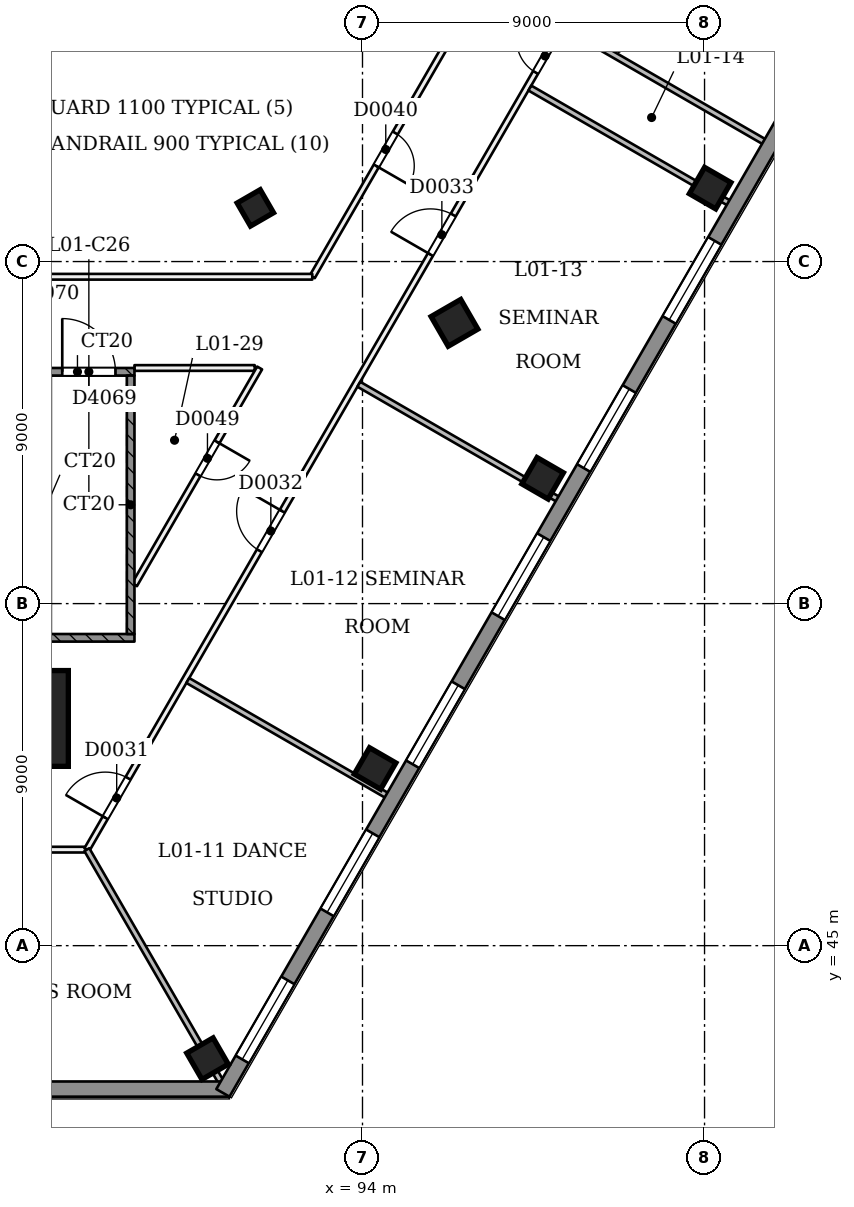
"""IFC4 building model, lengths in metres.
Left out: names, types, materials, properties, quantities, classifications, styles, units other than length and angle.
Written with IfcOpenShell. Run it as: python <this file> out.ifc"""

import sys

from ifc_helpers import new_model, si_unit, direction, frame, frame_2d, origin, origin_2d, place, context, subcontext, project, spatial, rectangle, extrude, element, fill, save


model = new_model("IFC4")
c1 = context("Model", 3, precision=1e-05, world=origin(), true_north=direction((0.0, 1.0)))
c2 = subcontext(c1, "Body", "Model", "MODEL_VIEW")
j1 = project(units=[si_unit("LENGTHUNIT", "METRE"), si_unit("PLANEANGLEUNIT", "RADIAN")], contexts=[c1])
p1 = place(None, origin())
s1 = spatial("IfcSite", under=j1, at=p1, CompositionType="ELEMENT")
p2 = place(p1, origin())
s2 = spatial("IfcBuilding", under=s1, at=p2, CompositionType="ELEMENT")
p3 = place(p2, frame((0.0, 0.0, 9.0)))
s3 = spatial("IfcBuildingStorey", under=s2, at=p3, CompositionType="ELEMENT", Elevation=9.0)
p4 = place(p3, frame((91.208, 64.365, -0.021), z_axis=(-0.02216777731, 0.038481960612, 0.999013377466), x_axis=(-0.501085972536, -0.865112581326, 0.022205174152)))
e1 = element("IfcColumn", 1, at=p4, inside=s3, PredefinedType="COLUMN", context=c2, shape_type="SweptSolid", body=[
    extrude(rectangle(XDim=0.7, YDim=0.7, at=origin_2d()), origin(), (0.0, 0.0, 1.0), 4.504),
])
p5 = place(p3, frame((85.0, 50.908, 0.0), z_axis=(0.0, 0.058331497301, 0.998297268564), x_axis=(-1.0, 0.0, 0.0)))
e2 = element("IfcColumn", 2, at=p5, inside=s3, PredefinedType="COLUMN", context=c2, shape_type="SweptSolid", body=[
    extrude(rectangle(XDim=2.52, YDim=2.52, at=origin_2d()), origin(), (0.0, 0.0, 1.0), 4.508),
])
p6 = place(p3, frame((96.447, 61.34, -0.027), z_axis=(-0.022167823514, 0.038427840761, 0.999015459668), x_axis=(-0.500557781558, -0.865418902984, 0.022181742055)))
e3 = element("IfcColumn", 3, at=p6, inside=s3, PredefinedType="COLUMN", context=c2, shape_type="SweptSolid", body=[
    extrude(rectangle(XDim=0.9, YDim=0.9, at=origin_2d()), origin(), (0.0, 0.0, 1.0), 4.504),
])
for number, where, z_axis, x_axis in (
    (4, (89.923, 42.026, 0.0), (0.0, 0.0, 1.0), (0.866, 0.5, 0.0)),
    (5, (94.331, 49.662, 0.0), (0.0, 0.0, 1.0), (0.5, 0.866, 0.0)),
    (6, (98.739, 57.297, 0.0), (0.0, 0.0, 1.0), (0.5, 0.866, 0.0)),
    (7, (103.147, 64.932, 0.0), (0.0, 0.0, 1.0), (0.5, 0.866, 0.0)),
):
    element("IfcColumn", number, at=place(p3, frame(where, z_axis=z_axis, x_axis=x_axis)), inside=s3, PredefinedType="COLUMN", context=c2, shape_type="SweptSolid", body=[
        extrude(rectangle(XDim=0.8, YDim=0.8, at=origin_2d()), origin(), (0.0, 0.0, 1.0), 4.5),
    ])
p7 = place(p3, frame((83.253, 47.526, 0.0), z_axis=(0.0, 0.0, 1.0), x_axis=(1.0, 0.0, 0.0)))
e8 = element("IfcWall", 8, at=p7, inside=s3, PredefinedType="PARTITIONING", context=c2, shape_type="SweptSolid", body=[
    extrude(rectangle(XDim=3.495, YDim=0.15, at=frame_2d((1.747, 0.0))), origin(), (0.0, 0.0, 1.0), 4.05),
])
p8 = place(p7, frame((1.147, 0.0, 0.0)))
e9 = element("IfcOpeningElement", 9, at=p8, cuts=e8, PredefinedType="OPENING", context=c2, shape_type="SweptSolid", body=[
    extrude(rectangle(XDim=1.2, YDim=2.1, at=frame_2d((0.6, 1.05))), frame((0.0, 0.085, 0.0), z_axis=(0.0, -1.0, 0.0), x_axis=(1.0, 0.0, 0.0)), (0.0, 0.0, 1.0), 0.171),
])
p9 = place(p3, frame((86.747, 47.526, 0.0), z_axis=(0.0, 0.0, 1.0), x_axis=(0.500000085768, 0.866025354266, 0.0)))
e10 = element("IfcWall", 10, at=p9, inside=s3, PredefinedType="PARTITIONING", context=c2, shape_type="SweptSolid", body=[
    extrude(rectangle(XDim=55.365, YDim=0.15, at=frame_2d((27.682, 0.0))), origin(), (0.0, 0.0, 1.0), 4.05),
])
p10 = place(p9, frame((0.97, 0.0, 0.0)))
e11 = element("IfcOpeningElement", 11, at=p10, cuts=e10, PredefinedType="OPENING", context=c2, shape_type="SweptSolid", body=[
    extrude(rectangle(XDim=1.2, YDim=2.1, at=frame_2d((0.6, 1.05))), frame((0.0, 0.085, 0.0), z_axis=(0.0, -1.0, 0.0), x_axis=(1.0, 0.0, 0.0)), (0.0, 0.0, 1.0), 0.171),
])
p11 = place(p9, frame((9.082, 0.0, 0.0)))
e12 = element("IfcOpeningElement", 12, at=p11, cuts=e10, PredefinedType="OPENING", context=c2, shape_type="SweptSolid", body=[
    extrude(rectangle(XDim=1.2, YDim=2.1, at=frame_2d((0.6, 1.05))), frame((0.0, 0.085, 0.0), z_axis=(0.0, -1.0, 0.0), x_axis=(1.0, 0.0, 0.0)), (0.0, 0.0, 1.0), 0.171),
])
p12 = place(p9, frame((18.082, 0.0, 0.0)))
e13 = element("IfcOpeningElement", 13, at=p12, cuts=e10, PredefinedType="OPENING", context=c2, shape_type="SweptSolid", body=[
    extrude(rectangle(XDim=1.2, YDim=2.1, at=frame_2d((0.6, 1.05))), frame((0.0, 0.085, 0.0), z_axis=(0.0, -1.0, 0.0), x_axis=(1.0, 0.0, 0.0)), (0.0, 0.0, 1.0), 0.171),
])
p13 = place(p9, frame((23.613, 0.0, 0.0)))
e14 = element("IfcOpeningElement", 14, at=p13, cuts=e10, PredefinedType="OPENING", context=c2, shape_type="SweptSolid", body=[
    extrude(rectangle(XDim=1.0, YDim=2.1, at=frame_2d((0.5, 1.05))), frame((0.0, 0.085, 0.0), z_axis=(0.0, -1.0, 0.0), x_axis=(1.0, 0.0, 0.0)), (0.0, 0.0, 1.0), 0.171),
])
p14 = place(p9, frame((26.363, 0.0, 0.0)))
e15 = element("IfcOpeningElement", 15, at=p14, cuts=e10, PredefinedType="OPENING", context=c2, shape_type="SweptSolid", body=[
    extrude(rectangle(XDim=1.0, YDim=2.1, at=frame_2d((0.5, 1.05))), frame((0.0, 0.085, 0.0), z_axis=(0.0, -1.0, 0.0), x_axis=(1.0, 0.0, 0.0)), (0.0, 0.0, 1.0), 0.171),
])
p15 = place(p9, frame((33.032, 0.0, 0.0)))
e16 = element("IfcOpeningElement", 16, at=p15, cuts=e10, PredefinedType="OPENING", context=c2, shape_type="SweptSolid", body=[
    extrude(rectangle(XDim=1.2, YDim=2.1, at=frame_2d((0.6, 1.05))), frame((0.0, 0.085, 0.0), z_axis=(0.0, -1.0, 0.0), x_axis=(1.0, 0.0, 0.0)), (0.0, 0.0, 1.0), 0.171),
])
p16 = place(p9, frame((47.337, 0.0, 0.0)))
e17 = element("IfcOpeningElement", 17, at=p16, cuts=e10, PredefinedType="OPENING", context=c2, shape_type="SweptSolid", body=[
    extrude(rectangle(XDim=1.2, YDim=2.1, at=frame_2d((0.6, 1.05))), frame((0.0, 0.085, 0.0), z_axis=(0.0, -1.0, 0.0), x_axis=(1.0, 0.0, 0.0)), (0.0, 0.0, 1.0), 0.171),
])
p17 = place(p3, frame((108.614, 90.2, 0.0), z_axis=(0.0, 0.0, 1.0), x_axis=(-0.500000743568, -0.866024974485, 0.0)))
e18 = element("IfcWall", 18, at=p17, inside=s3, PredefinedType="PARTITIONING", context=c2, shape_type="SweptSolid", body=[
    extrude(rectangle(XDim=31.87, YDim=0.15, at=frame_2d((15.935, 0.0))), origin(), (0.0, 0.0, 1.0), 4.05),
])
p18 = place(p17, frame((17.588, 0.0, 0.0)))
e19 = element("IfcOpeningElement", 19, at=p18, cuts=e18, PredefinedType="OPENING", context=c2, shape_type="SweptSolid", body=[
    extrude(rectangle(XDim=1.2, YDim=2.1, at=frame_2d((0.6, 1.05))), frame((0.0, 0.085, 0.0), z_axis=(0.0, -1.0, 0.0), x_axis=(1.0, 0.0, 0.0)), (0.0, 0.0, 1.0), 0.171),
])
p19 = place(p17, frame((27.503, 0.0, 0.0)))
e20 = element("IfcOpeningElement", 20, at=p19, cuts=e18, PredefinedType="OPENING", context=c2, shape_type="SweptSolid", body=[
    extrude(rectangle(XDim=1.0, YDim=2.1, at=frame_2d((0.5, 1.05))), frame((0.0, 0.085, 0.0), z_axis=(0.0, -1.0, 0.0), x_axis=(1.0, 0.0, 0.0)), (0.0, 0.0, 1.0), 0.171),
])
p20 = place(p17, frame((8.135, 0.0, 0.0)))
e21 = element("IfcOpeningElement", 21, at=p20, cuts=e18, PredefinedType="OPENING", context=c2, shape_type="SweptSolid", body=[
    extrude(rectangle(XDim=1.0, YDim=2.1, at=frame_2d((0.5, 1.05))), frame((0.0, 0.085, 0.0), z_axis=(0.0, -1.0, 0.0), x_axis=(1.0, 0.0, 0.0)), (0.0, 0.0, 1.0), 0.171),
])
p21 = place(p3, frame((92.679, 62.6, 0.0), z_axis=(0.0, 0.0, 1.0), x_axis=(-1.0, 0.0, 0.0)))
e22 = element("IfcWall", 22, at=p21, inside=s3, PredefinedType="PARTITIONING", context=c2, shape_type="SweptSolid", body=[
    extrude(rectangle(XDim=15.357, YDim=0.15, at=frame_2d((7.679, 0.0))), origin(), (0.0, 0.0, 1.0), 4.05),
])
p22 = place(p3, frame((88.0, 60.199, 0.0), z_axis=(0.0, 0.0, 1.0), x_axis=(0.999999952341, 0.00030873725, 0.0)))
e23 = element("IfcWall", 23, at=p22, inside=s3, PredefinedType="PARTITIONING", context=c2, shape_type="SweptSolid", body=[
    extrude(rectangle(XDim=3.163, YDim=0.15, at=frame_2d((1.582, 0.0))), origin(), (0.0, 0.0, 1.0), 4.05),
])
p23 = place(p3, frame((91.293, 60.2, 0.0), z_axis=(0.0, 0.0, 1.0), x_axis=(-0.500010165703, -0.866019534533, 0.0)))
e24 = element("IfcWall", 24, at=p23, inside=s3, PredefinedType="PARTITIONING", context=c2, shape_type="SweptSolid", body=[
    extrude(rectangle(XDim=6.586, YDim=0.15, at=frame_2d((3.293, 0.0))), origin(), (0.0, 0.0, 1.0), 4.05),
])
p24 = place(p23, frame((2.245, 0.0, 0.0)))
e25 = element("IfcOpeningElement", 25, at=p24, cuts=e24, PredefinedType="OPENING", context=c2, shape_type="SweptSolid", body=[
    extrude(rectangle(XDim=1.0, YDim=2.1, at=frame_2d((0.5, 1.05))), frame((0.0, 0.085, 0.0), z_axis=(0.0, -1.0, 0.0), x_axis=(1.0, 0.0, 0.0)), (0.0, 0.0, 1.0), 0.171),
])
p25 = place(p3, frame((90.442, 41.126, 0.0), z_axis=(0.0, 0.0, 1.0), x_axis=(-0.499994120305, 0.866028798401, 0.0)))
e26 = element("IfcWall", 26, at=p25, inside=s3, PredefinedType="PARTITIONING", context=c2, shape_type="SweptSolid", body=[
    extrude(rectangle(XDim=7.39, YDim=0.15, at=frame_2d((3.695, 0.0))), origin(), (0.0, 0.0, 1.0), 4.05),
])
for number, where, z_axis, x_axis in (
    (27, (94.881, 48.814, 0.0), (0.0, 0.0, 1.0), (-0.866, 0.5, 0.0)),
    (28, (99.381, 56.609, 0.0), (0.0, 0.0, 1.0), (-0.866, 0.5, 0.0)),
    (29, (103.881, 64.403, 0.0), (0.0, 0.0, 1.0), (-0.866, 0.5, 0.0)),
):
    element("IfcWall", number, at=place(p3, frame(where, z_axis=z_axis, x_axis=x_axis)), inside=s3, PredefinedType="PARTITIONING", context=c2, shape_type="SweptSolid", body=[
        extrude(rectangle(XDim=6.325, YDim=0.15, at=frame_2d((3.163, 0.0))), origin(), (0.0, 0.0, 1.0), 4.05),
    ])
p26 = place(p3, frame((104.811, 66.014, 0.0), z_axis=(0.0, 0.0, 1.0), x_axis=(-0.866032601554, 0.49998753289, 0.0)))
e30 = element("IfcWall", 30, at=p26, inside=s3, PredefinedType="PARTITIONING", context=c2, shape_type="SweptSolid", body=[
    extrude(rectangle(XDim=6.325, YDim=0.15, at=frame_2d((3.163, 0.0))), origin(), (0.0, 0.0, 1.0), 4.05),
])
p27 = place(p3, frame((106.131, 68.3, 0.0), z_axis=(0.0, 0.0, 1.0), x_axis=(-0.866042250622, 0.499970819286, 0.0)))
e31 = element("IfcWall", 31, at=p27, inside=s3, PredefinedType="PARTITIONING", context=c2, shape_type="SweptSolid", body=[
    extrude(rectangle(XDim=6.325, YDim=0.15, at=frame_2d((3.163, 0.0))), origin(), (0.0, 0.0, 1.0), 4.05),
])
p28 = place(p3, frame((90.5, 41.226, 0.0), z_axis=(0.0, 0.0, 1.0), x_axis=(-1.0, 0.0, 0.0)))
e32 = element("IfcWall", 32, at=p28, inside=s3, PredefinedType="SOLIDWALL", context=c2, shape_type="SweptSolid", body=[
    extrude(rectangle(XDim=11.0, YDim=0.4, at=frame_2d((5.5, 0.0))), origin(), (0.0, 0.0, 1.0), 4.05),
])
p29 = place(p3, frame((121.762, 95.574, 0.0), z_axis=(0.0, 0.0, 1.0), x_axis=(-0.499997306052, -0.866026959131, 0.0)))
e33 = element("IfcWall", 33, at=p29, inside=s3, PredefinedType="SOLIDWALL", context=c2, shape_type="SweptSolid", body=[
    extrude(rectangle(XDim=62.87, YDim=0.4, at=frame_2d((31.435, 0.0))), origin(), (0.0, 0.0, 1.0), 4.05),
])
p30 = place(p29, frame((59.452, 0.0, 0.9)))
e34 = element("IfcOpeningElement", 34, at=p30, cuts=e33, PredefinedType="OPENING", context=c2, shape_type="SweptSolid", body=[
    extrude(rectangle(XDim=2.4, YDim=1.5, at=frame_2d((1.2, 0.75))), frame((0.0, 0.21, 0.0), z_axis=(0.0, -1.0, 0.0), x_axis=(1.0, 0.0, 0.0)), (0.0, 0.0, 1.0), 0.421),
])
p31 = place(p29, frame((54.986, 0.0, 0.9)))
e35 = element("IfcOpeningElement", 35, at=p31, cuts=e33, PredefinedType="OPENING", context=c2, shape_type="SweptSolid", body=[
    extrude(rectangle(XDim=2.4, YDim=1.5, at=frame_2d((1.2, 0.75))), frame((0.0, 0.21, 0.0), z_axis=(0.0, -1.0, 0.0), x_axis=(1.0, 0.0, 0.0)), (0.0, 0.0, 1.0), 0.421),
])
p32 = place(p29, frame((50.486, 0.0, 0.9)))
e36 = element("IfcOpeningElement", 36, at=p32, cuts=e33, PredefinedType="OPENING", context=c2, shape_type="SweptSolid", body=[
    extrude(rectangle(XDim=2.4, YDim=1.5, at=frame_2d((1.2, 0.75))), frame((0.0, 0.21, 0.0), z_axis=(0.0, -1.0, 0.0), x_axis=(1.0, 0.0, 0.0)), (0.0, 0.0, 1.0), 0.421),
])
p33 = place(p29, frame((45.986, 0.0, 0.9)))
e37 = element("IfcOpeningElement", 37, at=p33, cuts=e33, PredefinedType="OPENING", context=c2, shape_type="SweptSolid", body=[
    extrude(rectangle(XDim=2.4, YDim=1.5, at=frame_2d((1.2, 0.75))), frame((0.0, 0.21, 0.0), z_axis=(0.0, -1.0, 0.0), x_axis=(1.0, 0.0, 0.0)), (0.0, 0.0, 1.0), 0.421),
])
p34 = place(p29, frame((41.486, 0.0, 0.9)))
e38 = element("IfcOpeningElement", 38, at=p34, cuts=e33, PredefinedType="OPENING", context=c2, shape_type="SweptSolid", body=[
    extrude(rectangle(XDim=2.4, YDim=1.5, at=frame_2d((1.2, 0.75))), frame((0.0, 0.21, 0.0), z_axis=(0.0, -1.0, 0.0), x_axis=(1.0, 0.0, 0.0)), (0.0, 0.0, 1.0), 0.421),
])
p35 = place(p29, frame((36.986, 0.0, 0.9)))
e39 = element("IfcOpeningElement", 39, at=p35, cuts=e33, PredefinedType="OPENING", context=c2, shape_type="SweptSolid", body=[
    extrude(rectangle(XDim=2.4, YDim=1.5, at=frame_2d((1.2, 0.75))), frame((0.0, 0.21, 0.0), z_axis=(0.0, -1.0, 0.0), x_axis=(1.0, 0.0, 0.0)), (0.0, 0.0, 1.0), 0.421),
])
p36 = place(p29, frame((23.486, 0.0, 0.9)))
e40 = element("IfcOpeningElement", 40, at=p36, cuts=e33, PredefinedType="OPENING", context=c2, shape_type="SweptSolid", body=[
    extrude(rectangle(XDim=2.4, YDim=1.5, at=frame_2d((1.2, 0.75))), frame((0.0, 0.21, 0.0), z_axis=(0.0, -1.0, 0.0), x_axis=(1.0, 0.0, 0.0)), (0.0, 0.0, 1.0), 0.421),
])
p37 = place(p29, frame((18.986, 0.0, 0.9)))
e41 = element("IfcOpeningElement", 41, at=p37, cuts=e33, PredefinedType="OPENING", context=c2, shape_type="SweptSolid", body=[
    extrude(rectangle(XDim=2.4, YDim=1.5, at=frame_2d((1.2, 0.75))), frame((0.0, 0.21, 0.0), z_axis=(0.0, -1.0, 0.0), x_axis=(1.0, 0.0, 0.0)), (0.0, 0.0, 1.0), 0.421),
])
p38 = place(p29, frame((14.486, 0.0, 0.9)))
e42 = element("IfcOpeningElement", 42, at=p38, cuts=e33, PredefinedType="OPENING", context=c2, shape_type="SweptSolid", body=[
    extrude(rectangle(XDim=2.4, YDim=1.5, at=frame_2d((1.2, 0.75))), frame((0.0, 0.21, 0.0), z_axis=(0.0, -1.0, 0.0), x_axis=(1.0, 0.0, 0.0)), (0.0, 0.0, 1.0), 0.421),
])
p39 = place(p29, frame((5.486, 0.0, 0.9)))
e43 = element("IfcOpeningElement", 43, at=p39, cuts=e33, PredefinedType="OPENING", context=c2, shape_type="SweptSolid", body=[
    extrude(rectangle(XDim=2.4, YDim=1.5, at=frame_2d((1.2, 0.75))), frame((0.0, 0.21, 0.0), z_axis=(0.0, -1.0, 0.0), x_axis=(1.0, 0.0, 0.0)), (0.0, 0.0, 1.0), 0.421),
])
p40 = place(p29, frame((1.018, 0.0, 0.9)))
e44 = element("IfcOpeningElement", 44, at=p40, cuts=e33, PredefinedType="OPENING", context=c2, shape_type="SweptSolid", body=[
    extrude(rectangle(XDim=2.4, YDim=1.5, at=frame_2d((1.2, 0.75))), frame((0.0, 0.21, 0.0), z_axis=(0.0, -1.0, 0.0), x_axis=(1.0, 0.0, 0.0)), (0.0, 0.0, 1.0), 0.421),
])
p41 = place(p3, frame((82.0, 60.1, 0.0), z_axis=(0.0, 0.0, 1.0), x_axis=(1.0, 0.0, 0.0)))
e45 = element("IfcWall", 45, at=p41, inside=s3, PredefinedType="SOLIDWALL", context=c2, shape_type="SweptSolid", body=[
    extrude(rectangle(XDim=6.0, YDim=0.2, at=frame_2d((3.0, 0.0))), origin(), (0.0, 0.0, 1.0), 4.05),
])
p42 = place(p41, frame((4.1, 0.0, 0.0)))
e46 = element("IfcOpeningElement", 46, at=p42, cuts=e45, PredefinedType="OPENING", context=c2, shape_type="SweptSolid", body=[
    extrude(rectangle(XDim=1.4, YDim=2.1, at=frame_2d((0.7, 1.05))), frame((0.0, 0.11, 0.0), z_axis=(0.0, -1.0, 0.0), x_axis=(1.0, 0.0, 0.0)), (0.0, 0.0, 1.0), 0.221),
])
p43 = place(p3, frame((82.0, 53.1, 0.0), z_axis=(0.0, 0.0, 1.0), x_axis=(1.0, 0.0, 0.0)))
e47 = element("IfcWall", 47, at=p43, inside=s3, PredefinedType="SOLIDWALL", context=c2, shape_type="SweptSolid", body=[
    extrude(rectangle(XDim=6.0, YDim=0.2, at=frame_2d((3.0, 0.0))), origin(), (0.0, 0.0, 1.0), 4.05),
])
p44 = place(p3, frame((87.9, 53.2, 0.0), z_axis=(0.0, 0.0, 1.0), x_axis=(0.0, 1.0, 0.0)))
e48 = element("IfcWall", 48, at=p44, inside=s3, PredefinedType="SOLIDWALL", context=c2, shape_type="SweptSolid", body=[
    extrude(rectangle(XDim=6.8, YDim=0.2, at=frame_2d((3.4, 0.0))), origin(), (0.0, 0.0, 1.0), 4.05),
])
p45 = place(p10, origin())
e49 = element("IfcDoor", 49, at=p45, inside=s3, OperationType="SINGLE_SWING_LEFT", PredefinedType="NOTDEFINED", context=c2, shape_type="SweptSolid", body=[
    extrude(rectangle(XDim=1.2, YDim=2.1, at=frame_2d((0.6, 1.05))), frame((0.0, 0.025, 0.0), z_axis=(0.0, -1.0, 0.0), x_axis=(1.0, 0.0, 0.0)), (0.0, 0.0, 1.0), 0.05),
])
fill(e11, e49)
p46 = place(p11, origin())
e50 = element("IfcDoor", 50, at=p46, inside=s3, OperationType="SINGLE_SWING_RIGHT", PredefinedType="NOTDEFINED", context=c2, shape_type="SweptSolid", body=[
    extrude(rectangle(XDim=1.2, YDim=2.1, at=frame_2d((0.6, 1.05))), frame((0.0, 0.025, 0.0), z_axis=(0.0, -1.0, 0.0), x_axis=(1.0, 0.0, 0.0)), (0.0, 0.0, 1.0), 0.05),
])
fill(e12, e50)
p47 = place(p12, origin())
e51 = element("IfcDoor", 51, at=p47, inside=s3, OperationType="SINGLE_SWING_LEFT", PredefinedType="NOTDEFINED", context=c2, shape_type="SweptSolid", body=[
    extrude(rectangle(XDim=1.2, YDim=2.1, at=frame_2d((0.6, 1.05))), frame((0.0, 0.025, 0.0), z_axis=(0.0, -1.0, 0.0), x_axis=(1.0, 0.0, 0.0)), (0.0, 0.0, 1.0), 0.05),
])
fill(e13, e51)
p48 = place(p13, origin())
e52 = element("IfcDoor", 52, at=p48, inside=s3, OperationType="SINGLE_SWING_RIGHT", PredefinedType="NOTDEFINED", context=c2, shape_type="SweptSolid", body=[
    extrude(rectangle(XDim=1.0, YDim=2.1, at=frame_2d((0.5, 1.05))), frame((0.0, 0.025, 0.0), z_axis=(0.0, -1.0, 0.0), x_axis=(1.0, 0.0, 0.0)), (0.0, 0.0, 1.0), 0.05),
])
fill(e14, e52)
p49 = place(p19, origin())
e53 = element("IfcDoor", 53, at=p49, inside=s3, OperationType="SINGLE_SWING_RIGHT", PredefinedType="NOTDEFINED", context=c2, shape_type="SweptSolid", body=[
    extrude(rectangle(XDim=1.0, YDim=2.1, at=frame_2d((0.5, 1.05))), frame((0.0, 0.025, 0.0), z_axis=(0.0, -1.0, 0.0), x_axis=(1.0, 0.0, 0.0)), (0.0, 0.0, 1.0), 0.05),
])
fill(e20, e53)
p50 = place(p24, origin())
e54 = element("IfcDoor", 54, at=p50, inside=s3, OperationType="SINGLE_SWING_LEFT", PredefinedType="NOTDEFINED", context=c2, shape_type="SweptSolid", body=[
    extrude(rectangle(XDim=1.0, YDim=2.1, at=frame_2d((0.5, 1.05))), frame((0.0, 0.025, 0.0), z_axis=(0.0, -1.0, 0.0), x_axis=(1.0, 0.0, 0.0)), (0.0, 0.0, 1.0), 0.05),
])
fill(e25, e54)
p51 = place(p30, origin())
e55 = element("IfcWindow", 55, at=p51, inside=s3, PartitioningType="SINGLE_PANEL", PredefinedType="WINDOW", context=c2, shape_type="SweptSolid", body=[
    extrude(rectangle(XDim=2.4, YDim=1.5, at=frame_2d((1.2, 0.75))), frame((0.0, 0.03, 0.0), z_axis=(0.0, -1.0, 0.0), x_axis=(1.0, 0.0, 0.0)), (0.0, 0.0, 1.0), 0.06),
])
fill(e34, e55)
p52 = place(p31, origin())
e56 = element("IfcWindow", 56, at=p52, inside=s3, PartitioningType="SINGLE_PANEL", PredefinedType="WINDOW", context=c2, shape_type="SweptSolid", body=[
    extrude(rectangle(XDim=2.4, YDim=1.5, at=frame_2d((1.2, 0.75))), frame((0.0, 0.03, 0.0), z_axis=(0.0, -1.0, 0.0), x_axis=(1.0, 0.0, 0.0)), (0.0, 0.0, 1.0), 0.06),
])
fill(e35, e56)
p53 = place(p32, origin())
e57 = element("IfcWindow", 57, at=p53, inside=s3, PartitioningType="SINGLE_PANEL", PredefinedType="WINDOW", context=c2, shape_type="SweptSolid", body=[
    extrude(rectangle(XDim=2.4, YDim=1.5, at=frame_2d((1.2, 0.75))), frame((0.0, 0.03, 0.0), z_axis=(0.0, -1.0, 0.0), x_axis=(1.0, 0.0, 0.0)), (0.0, 0.0, 1.0), 0.06),
])
fill(e36, e57)
p54 = place(p33, origin())
e58 = element("IfcWindow", 58, at=p54, inside=s3, PartitioningType="SINGLE_PANEL", PredefinedType="WINDOW", context=c2, shape_type="SweptSolid", body=[
    extrude(rectangle(XDim=2.4, YDim=1.5, at=frame_2d((1.2, 0.75))), frame((0.0, 0.03, 0.0), z_axis=(0.0, -1.0, 0.0), x_axis=(1.0, 0.0, 0.0)), (0.0, 0.0, 1.0), 0.06),
])
fill(e37, e58)
p55 = place(p34, origin())
e59 = element("IfcWindow", 59, at=p55, inside=s3, PartitioningType="SINGLE_PANEL", PredefinedType="WINDOW", context=c2, shape_type="SweptSolid", body=[
    extrude(rectangle(XDim=2.4, YDim=1.5, at=frame_2d((1.2, 0.75))), frame((0.0, 0.03, 0.0), z_axis=(0.0, -1.0, 0.0), x_axis=(1.0, 0.0, 0.0)), (0.0, 0.0, 1.0), 0.06),
])
fill(e38, e59)
p56 = place(p35, origin())
e60 = element("IfcWindow", 60, at=p56, inside=s3, PartitioningType="SINGLE_PANEL", PredefinedType="WINDOW", context=c2, shape_type="SweptSolid", body=[
    extrude(rectangle(XDim=2.4, YDim=1.5, at=frame_2d((1.2, 0.75))), frame((0.0, 0.03, 0.0), z_axis=(0.0, -1.0, 0.0), x_axis=(1.0, 0.0, 0.0)), (0.0, 0.0, 1.0), 0.06),
])
fill(e39, e60)
p57 = place(p42, origin())
e61 = element("IfcDoor", 61, at=p57, inside=s3, OperationType="SINGLE_SWING_LEFT", PredefinedType="NOTDEFINED", context=c2, shape_type="SweptSolid", body=[
    extrude(rectangle(XDim=1.4, YDim=2.1, at=frame_2d((0.7, 1.05))), frame((0.0, 0.025, 0.0), z_axis=(0.0, -1.0, 0.0), x_axis=(1.0, 0.0, 0.0)), (0.0, 0.0, 1.0), 0.05),
])
fill(e46, e61)
save(model, sys.argv[1])
